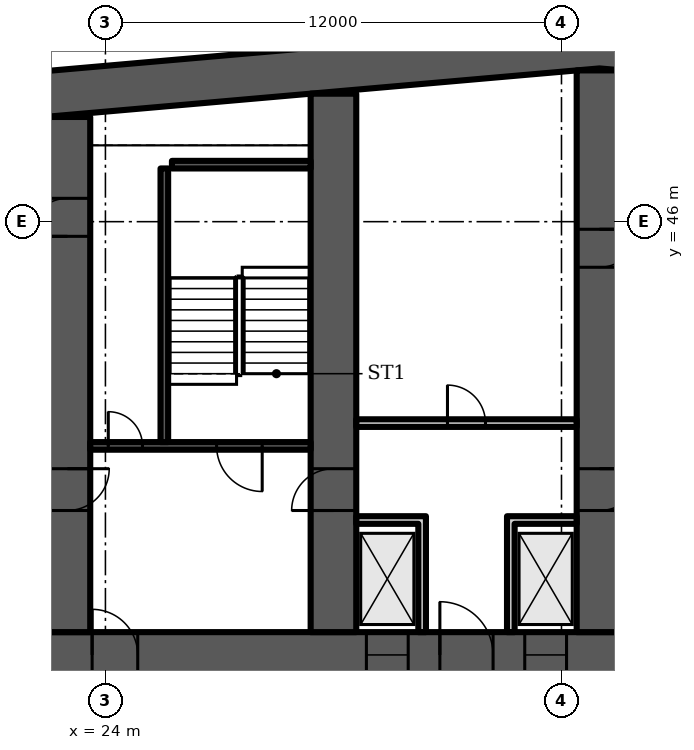
"""IFC4 building model, lengths in metres.
Left out: names, types, materials, properties, quantities, classifications, styles, units other than length and angle.
Written with IfcOpenShell. Run it as: python <this file> out.ifc"""

import sys

from ifc_helpers import new_model, si_unit, direction, frame, frame_2d, origin, place, context, subcontext, project, spatial, polyline, rectangle, outline, extrude, element, fill, save


model = new_model("IFC4")
c1 = context("Model", 3, precision=1e-05, world=origin(), true_north=direction((0.0, 1.0)))
c2 = subcontext(c1, "Body", "Model", "MODEL_VIEW")
j1 = project(units=[si_unit("LENGTHUNIT", "METRE"), si_unit("PLANEANGLEUNIT", "RADIAN")], contexts=[c1])
p1 = place(None, origin())
s1 = spatial("IfcSite", under=j1, at=p1, CompositionType="ELEMENT")
p2 = place(p1, origin())
s2 = spatial("IfcBuilding", under=s1, at=p2, CompositionType="ELEMENT")
p3 = place(p2, frame((0.0, 0.0, 55.9)))
s3 = spatial("IfcBuildingStorey", under=s2, at=p3, CompositionType="ELEMENT", Elevation=55.9)
p4 = place(p3, origin())
e1 = element("IfcWall", 1, at=p4, inside=s3, PredefinedType="SHEAR", context=c2, shape_type="SweptSolid", body=[
    extrude(outline(polyline([(9.0, 47.583), (37.0, 50.032), (65.0, 47.583), (65.0, 48.787), (37.0, 51.237), (9.0, 48.787), (9.0, 47.583)])), origin(), (0.0, 0.0, 1.0), 3.6),
])
p5 = place(p3, frame((9.0, 34.6, 0.0), z_axis=(0.0, 0.0, 1.0), x_axis=(1.0, 0.0, 0.0)))
e2 = element("IfcWall", 2, at=p5, inside=s3, PredefinedType="SHEAR", context=c2, shape_type="SweptSolid", body=[
    extrude(rectangle(XDim=56.0, YDim=1.2, at=frame_2d((28.0, 0.0))), origin(), (0.0, 0.0, 1.0), 3.6),
])
p6 = place(p5, frame((3.3, 0.0, 0.0)))
e3 = element("IfcOpeningElement", 3, at=p6, cuts=e2, PredefinedType="OPENING", context=c2, shape_type="SweptSolid", body=[
    extrude(rectangle(XDim=1.0, YDim=2.1, at=frame_2d((0.5, 1.05))), frame((0.0, 0.61, 0.0), z_axis=(0.0, -1.0, 0.0), x_axis=(1.0, 0.0, 0.0)), (0.0, 0.0, 1.0), 1.22),
])
p7 = place(p5, frame((7.867, 0.0, 0.0)))
e4 = element("IfcOpeningElement", 4, at=p7, cuts=e2, PredefinedType="OPENING", context=c2, shape_type="SweptSolid", body=[
    extrude(rectangle(XDim=1.1, YDim=2.1, at=frame_2d((0.55, 1.05))), frame((0.0, 0.61, 0.0), z_axis=(0.0, -1.0, 0.0), x_axis=(1.0, 0.0, 0.0)), (0.0, 0.0, 1.0), 1.22),
])
p8 = place(p5, frame((12.033, 0.0, 0.0)))
e5 = element("IfcOpeningElement", 5, at=p8, cuts=e2, PredefinedType="OPENING", context=c2, shape_type="SweptSolid", body=[
    extrude(rectangle(XDim=1.1, YDim=2.1, at=frame_2d((0.55, 1.05))), frame((0.0, 0.61, 0.0), z_axis=(0.0, -1.0, 0.0), x_axis=(1.0, 0.0, 0.0)), (0.0, 0.0, 1.0), 1.22),
])
p9 = place(p5, frame((9.8, 0.0, 0.0)))
e6 = element("IfcOpeningElement", 6, at=p9, cuts=e2, PredefinedType="OPENING", context=c2, shape_type="SweptSolid", body=[
    extrude(rectangle(XDim=1.4, YDim=2.1, at=frame_2d((0.7, 1.05))), frame((0.0, 0.61, 0.0), z_axis=(0.0, -1.0, 0.0), x_axis=(1.0, 0.0, 0.0)), (0.0, 0.0, 1.0), 1.22),
])
p10 = place(p5, frame((14.65, 0.0, 0.0)))
e7 = element("IfcOpeningElement", 7, at=p10, cuts=e2, PredefinedType="OPENING", context=c2, shape_type="SweptSolid", body=[
    extrude(rectangle(XDim=1.2, YDim=2.1, at=frame_2d((0.6, 1.05))), frame((0.0, 0.61, 0.0), z_axis=(0.0, -1.0, 0.0), x_axis=(1.0, 0.0, 0.0)), (0.0, 0.0, 1.0), 1.22),
])
p11 = place(p5, frame((21.867, 0.0, 0.0)))
e8 = element("IfcOpeningElement", 8, at=p11, cuts=e2, PredefinedType="OPENING", context=c2, shape_type="SweptSolid", body=[
    extrude(rectangle(XDim=1.1, YDim=2.1, at=frame_2d((0.55, 1.05))), frame((0.0, 0.61, 0.0), z_axis=(0.0, -1.0, 0.0), x_axis=(1.0, 0.0, 0.0)), (0.0, 0.0, 1.0), 1.22),
])
p12 = place(p5, frame((26.033, 0.0, 0.0)))
e9 = element("IfcOpeningElement", 9, at=p12, cuts=e2, PredefinedType="OPENING", context=c2, shape_type="SweptSolid", body=[
    extrude(rectangle(XDim=1.1, YDim=2.1, at=frame_2d((0.55, 1.05))), frame((0.0, 0.61, 0.0), z_axis=(0.0, -1.0, 0.0), x_axis=(1.0, 0.0, 0.0)), (0.0, 0.0, 1.0), 1.22),
])
p13 = place(p5, frame((23.8, 0.0, 0.0)))
e10 = element("IfcOpeningElement", 10, at=p13, cuts=e2, PredefinedType="OPENING", context=c2, shape_type="SweptSolid", body=[
    extrude(rectangle(XDim=1.4, YDim=2.1, at=frame_2d((0.7, 1.05))), frame((0.0, 0.61, 0.0), z_axis=(0.0, -1.0, 0.0), x_axis=(1.0, 0.0, 0.0)), (0.0, 0.0, 1.0), 1.22),
])
p14 = place(p5, frame((28.867, 0.0, 0.0)))
e11 = element("IfcOpeningElement", 11, at=p14, cuts=e2, PredefinedType="OPENING", context=c2, shape_type="SweptSolid", body=[
    extrude(rectangle(XDim=1.1, YDim=2.1, at=frame_2d((0.55, 1.05))), frame((0.0, 0.61, 0.0), z_axis=(0.0, -1.0, 0.0), x_axis=(1.0, 0.0, 0.0)), (0.0, 0.0, 1.0), 1.22),
])
p15 = place(p5, frame((33.033, 0.0, 0.0)))
e12 = element("IfcOpeningElement", 12, at=p15, cuts=e2, PredefinedType="OPENING", context=c2, shape_type="SweptSolid", body=[
    extrude(rectangle(XDim=1.1, YDim=2.1, at=frame_2d((0.55, 1.05))), frame((0.0, 0.61, 0.0), z_axis=(0.0, -1.0, 0.0), x_axis=(1.0, 0.0, 0.0)), (0.0, 0.0, 1.0), 1.22),
])
p16 = place(p5, frame((40.15, 0.0, 0.0)))
e13 = element("IfcOpeningElement", 13, at=p16, cuts=e2, PredefinedType="OPENING", context=c2, shape_type="SweptSolid", body=[
    extrude(rectangle(XDim=1.2, YDim=2.1, at=frame_2d((0.6, 1.05))), frame((0.0, 0.61, 0.0), z_axis=(0.0, -1.0, 0.0), x_axis=(1.0, 0.0, 0.0)), (0.0, 0.0, 1.0), 1.22),
])
p17 = place(p5, frame((44.8, 0.0, 0.0)))
e14 = element("IfcOpeningElement", 14, at=p17, cuts=e2, PredefinedType="OPENING", context=c2, shape_type="SweptSolid", body=[
    extrude(rectangle(XDim=1.4, YDim=2.1, at=frame_2d((0.7, 1.05))), frame((0.0, 0.61, 0.0), z_axis=(0.0, -1.0, 0.0), x_axis=(1.0, 0.0, 0.0)), (0.0, 0.0, 1.0), 1.22),
])
p18 = place(p5, frame((49.867, 0.0, 0.0)))
e15 = element("IfcOpeningElement", 15, at=p18, cuts=e2, PredefinedType="OPENING", context=c2, shape_type="SweptSolid", body=[
    extrude(rectangle(XDim=1.1, YDim=2.1, at=frame_2d((0.55, 1.05))), frame((0.0, 0.61, 0.0), z_axis=(0.0, -1.0, 0.0), x_axis=(1.0, 0.0, 0.0)), (0.0, 0.0, 1.0), 1.22),
])
p19 = place(p5, frame((53.5, 0.0, 0.0)))
e16 = element("IfcOpeningElement", 16, at=p19, cuts=e2, PredefinedType="OPENING", context=c2, shape_type="SweptSolid", body=[
    extrude(rectangle(XDim=1.1, YDim=2.1, at=frame_2d((0.55, 1.05))), frame((0.0, 0.61, 0.0), z_axis=(0.0, -1.0, 0.0), x_axis=(1.0, 0.0, 0.0)), (0.0, 0.0, 1.0), 1.22),
])
p20 = place(p5, frame((51.567, 0.0, 0.0)))
e17 = element("IfcOpeningElement", 17, at=p20, cuts=e2, PredefinedType="OPENING", context=c2, shape_type="SweptSolid", body=[
    extrude(rectangle(XDim=1.4, YDim=2.1, at=frame_2d((0.7, 1.05))), frame((0.0, 0.61, 0.0), z_axis=(0.0, -1.0, 0.0), x_axis=(1.0, 0.0, 0.0)), (0.0, 0.0, 1.0), 1.22),
])
p21 = place(p3, frame((23.0, 35.2, 0.0), z_axis=(0.0, 0.0, 1.0), x_axis=(0.0, 1.0, 0.0)))
e18 = element("IfcWall", 18, at=p21, inside=s3, PredefinedType="SHEAR", context=c2, shape_type="SweptSolid", body=[
    extrude(rectangle(XDim=13.555, YDim=1.2, at=frame_2d((6.778, 0.0))), origin(), (0.0, 0.0, 1.0), 3.6),
])
p22 = place(p21, frame((10.414, 0.0, 0.0)))
e19 = element("IfcOpeningElement", 19, at=p22, cuts=e18, PredefinedType="OPENING", context=c2, shape_type="SweptSolid", body=[
    extrude(rectangle(XDim=1.0, YDim=2.1, at=frame_2d((0.5, 1.05))), frame((0.0, 0.61, 0.0), z_axis=(0.0, -1.0, 0.0), x_axis=(1.0, 0.0, 0.0)), (0.0, 0.0, 1.0), 1.22),
])
p23 = place(p21, frame((3.2, 0.0, 0.0)))
e20 = element("IfcOpeningElement", 20, at=p23, cuts=e18, PredefinedType="OPENING", context=c2, shape_type="SweptSolid", body=[
    extrude(rectangle(XDim=1.1, YDim=2.1, at=frame_2d((0.55, 1.05))), frame((0.0, 0.61, 0.0), z_axis=(0.0, -1.0, 0.0), x_axis=(1.0, 0.0, 0.0)), (0.0, 0.0, 1.0), 1.22),
])
p24 = place(p3, frame((30.0, 35.2, 0.0), z_axis=(0.0, 0.0, 1.0), x_axis=(0.0, 1.0, 0.0)))
e21 = element("IfcWall", 21, at=p24, inside=s3, PredefinedType="SHEAR", context=c2, shape_type="SweptSolid", body=[
    extrude(rectangle(XDim=14.168, YDim=1.2, at=frame_2d((7.084, 0.0))), origin(), (0.0, 0.0, 1.0), 3.6),
])
p25 = place(p24, frame((3.2, 0.0, 0.0)))
e22 = element("IfcOpeningElement", 22, at=p25, cuts=e21, PredefinedType="OPENING", context=c2, shape_type="SweptSolid", body=[
    extrude(rectangle(XDim=1.1, YDim=2.1, at=frame_2d((0.55, 1.05))), frame((0.0, 0.61, 0.0), z_axis=(0.0, -1.0, 0.0), x_axis=(1.0, 0.0, 0.0)), (0.0, 0.0, 1.0), 1.22),
])
p26 = place(p3, frame((37.0, 35.2, 0.0), z_axis=(0.0, 0.0, 1.0), x_axis=(0.0, 1.0, 0.0)))
e23 = element("IfcWall", 23, at=p26, inside=s3, PredefinedType="SHEAR", context=c2, shape_type="SweptSolid", body=[
    extrude(rectangle(XDim=14.78, YDim=1.2, at=frame_2d((7.39, 0.0))), origin(), (0.0, 0.0, 1.0), 3.6),
])
p27 = place(p26, frame((3.2, 0.0, 0.0)))
e24 = element("IfcOpeningElement", 24, at=p27, cuts=e23, PredefinedType="OPENING", context=c2, shape_type="SweptSolid", body=[
    extrude(rectangle(XDim=1.1, YDim=2.1, at=frame_2d((0.55, 1.05))), frame((0.0, 0.61, 0.0), z_axis=(0.0, -1.0, 0.0), x_axis=(1.0, 0.0, 0.0)), (0.0, 0.0, 1.0), 1.22),
])
p28 = place(p26, frame((9.6, 0.0, 0.0)))
e25 = element("IfcOpeningElement", 25, at=p28, cuts=e23, PredefinedType="OPENING", context=c2, shape_type="SweptSolid", body=[
    extrude(rectangle(XDim=1.0, YDim=2.1, at=frame_2d((0.5, 1.05))), frame((0.0, 0.61, 0.0), z_axis=(0.0, -1.0, 0.0), x_axis=(1.0, 0.0, 0.0)), (0.0, 0.0, 1.0), 1.22),
])
p29 = place(p3, frame((23.6, 40.1, 0.0), z_axis=(0.0, 0.0, 1.0), x_axis=(1.0, 0.0, 0.0)))
e26 = element("IfcWall", 26, at=p29, inside=s3, PredefinedType="SHEAR", context=c2, shape_type="SweptSolid", body=[
    extrude(rectangle(XDim=5.8, YDim=0.2, at=frame_2d((2.9, 0.0))), origin(), (0.0, 0.0, 1.0), 3.2),
])
p30 = place(p29, frame((3.325, 0.0, 0.0)))
e27 = element("IfcOpeningElement", 27, at=p30, cuts=e26, PredefinedType="OPENING", context=c2, shape_type="SweptSolid", body=[
    extrude(rectangle(XDim=1.2, YDim=2.1, at=frame_2d((0.6, 1.05))), frame((0.0, 0.11, 0.0), z_axis=(0.0, -1.0, 0.0), x_axis=(1.0, 0.0, 0.0)), (0.0, 0.0, 1.0), 0.22),
])
p31 = place(p29, frame((0.475, 0.0, 0.0)))
e28 = element("IfcOpeningElement", 28, at=p31, cuts=e26, PredefinedType="OPENING", context=c2, shape_type="SweptSolid", body=[
    extrude(rectangle(XDim=0.9, YDim=2.1, at=frame_2d((0.45, 1.05))), frame((0.0, 0.11, 0.0), z_axis=(0.0, -1.0, 0.0), x_axis=(1.0, 0.0, 0.0)), (0.0, 0.0, 1.0), 0.22),
])
p32 = place(p3, frame((25.55, 40.2, 0.0), z_axis=(0.0, 0.0, 1.0), x_axis=(0.0, 1.0, 0.0)))
e29 = element("IfcWall", 29, at=p32, inside=s3, PredefinedType="SHEAR", context=c2, shape_type="SweptSolid", body=[
    extrude(rectangle(XDim=7.2, YDim=0.2, at=frame_2d((3.6, 0.0))), origin(), (0.0, 0.0, 1.0), 3.2),
])
p33 = place(p3, frame((25.75, 47.5, 0.0), z_axis=(0.0, 0.0, 1.0), x_axis=(1.0, 0.0, 0.0)))
e30 = element("IfcWall", 30, at=p33, inside=s3, PredefinedType="SHEAR", context=c2, shape_type="SweptSolid", body=[
    extrude(rectangle(XDim=3.65, YDim=0.2, at=frame_2d((1.825, 0.0))), origin(), (0.0, 0.0, 1.0), 3.2),
])
p34 = place(p3, frame((30.6, 40.7, 0.0), z_axis=(0.0, 0.0, 1.0), x_axis=(1.0, 0.0, 0.0)))
e31 = element("IfcWall", 31, at=p34, inside=s3, PredefinedType="PARTITIONING", context=c2, shape_type="SweptSolid", body=[
    extrude(rectangle(XDim=5.8, YDim=0.2, at=frame_2d((2.9, 0.0))), origin(), (0.0, 0.0, 1.0), 3.2),
])
p35 = place(p34, frame((2.4, 0.0, 0.0)))
e32 = element("IfcOpeningElement", 32, at=p35, cuts=e31, PredefinedType="OPENING", context=c2, shape_type="SweptSolid", body=[
    extrude(rectangle(XDim=1.0, YDim=2.1, at=frame_2d((0.5, 1.05))), frame((0.0, 0.11, 0.0), z_axis=(0.0, -1.0, 0.0), x_axis=(1.0, 0.0, 0.0)), (0.0, 0.0, 1.0), 0.22),
])
p36 = place(p3, origin())
e33 = element("IfcWall", 33, at=p36, inside=s3, PredefinedType="PARTITIONING", context=c2, shape_type="SweptSolid", body=[
    extrude(outline(polyline([(32.233, 38.05), (30.6, 38.05), (30.6, 38.25), (32.233, 38.25), (32.433, 38.25), (32.433, 35.2), (32.233, 35.2), (32.233, 38.05)])), origin(), (0.0, 0.0, 1.0), 3.2),
])
p37 = place(p3, origin())
e34 = element("IfcWall", 34, at=p37, inside=s3, PredefinedType="PARTITIONING", context=c2, shape_type="SweptSolid", body=[
    extrude(outline(polyline([(34.567, 38.25), (34.767, 38.25), (36.4, 38.25), (36.4, 38.05), (34.767, 38.05), (34.767, 35.2), (34.567, 35.2), (34.567, 38.25)])), origin(), (0.0, 0.0, 1.0), 3.2),
])
p38 = place(p22, origin())
e35 = element("IfcDoor", 35, at=p38, inside=s3, OperationType="SINGLE_SWING_LEFT", PredefinedType="DOOR", context=c2, shape_type="SweptSolid", body=[
    extrude(rectangle(XDim=1.0, YDim=2.1, at=frame_2d((0.5, 1.05))), frame((0.0, 0.6, 0.0), z_axis=(0.0, -1.0, 0.0), x_axis=(1.0, 0.0, 0.0)), (0.0, 0.0, 1.0), 1.199),
])
fill(e19, e35)
p39 = place(p30, origin())
e36 = element("IfcDoor", 36, at=p39, inside=s3, OperationType="SINGLE_SWING_RIGHT", PredefinedType="DOOR", context=c2, shape_type="SweptSolid", body=[
    extrude(rectangle(XDim=1.2, YDim=2.1, at=frame_2d((0.6, 1.05))), frame((0.0, 0.025, 0.0), z_axis=(0.0, -1.0, 0.0), x_axis=(1.0, 0.0, 0.0)), (0.0, 0.0, 1.0), 0.05),
])
fill(e27, e36)
p40 = place(p31, origin())
e37 = element("IfcDoor", 37, at=p40, inside=s3, OperationType="SINGLE_SWING_LEFT", PredefinedType="DOOR", context=c2, shape_type="SweptSolid", body=[
    extrude(rectangle(XDim=0.9, YDim=2.1, at=frame_2d((0.45, 1.05))), frame((0.0, 0.025, 0.0), z_axis=(0.0, -1.0, 0.0), x_axis=(1.0, 0.0, 0.0)), (0.0, 0.0, 1.0), 0.05),
])
fill(e28, e37)
p41 = place(p10, origin())
e38 = element("IfcDoor", 38, at=p41, inside=s3, OperationType="SINGLE_SWING_LEFT", PredefinedType="DOOR", context=c2, shape_type="SweptSolid", body=[
    extrude(rectangle(XDim=1.2, YDim=2.1, at=frame_2d((0.6, 1.05))), frame((0.0, 0.025, 0.0), z_axis=(0.0, -1.0, 0.0), x_axis=(1.0, 0.0, 0.0)), (0.0, 0.0, 1.0), 0.05),
])
fill(e7, e38)
p42 = place(p11, origin())
e39 = element("IfcDoor", 39, at=p42, inside=s3, OperationType="DOUBLE_DOOR_SLIDING", PredefinedType="DOOR", context=c2, shape_type="SweptSolid", body=[
    extrude(rectangle(XDim=1.1, YDim=2.1, at=frame_2d((0.55, 1.05))), frame((0.0, 0.025, 0.0), z_axis=(0.0, -1.0, 0.0), x_axis=(1.0, 0.0, 0.0)), (0.0, 0.0, 1.0), 0.05),
])
fill(e8, e39)
p43 = place(p12, origin())
e40 = element("IfcDoor", 40, at=p43, inside=s3, OperationType="DOUBLE_DOOR_SLIDING", PredefinedType="DOOR", context=c2, shape_type="SweptSolid", body=[
    extrude(rectangle(XDim=1.1, YDim=2.1, at=frame_2d((0.55, 1.05))), frame((0.0, 0.025, 0.0), z_axis=(0.0, -1.0, 0.0), x_axis=(1.0, 0.0, 0.0)), (0.0, 0.0, 1.0), 0.05),
])
fill(e9, e40)
p44 = place(p13, origin())
e41 = element("IfcDoor", 41, at=p44, inside=s3, OperationType="DOUBLE_DOOR_SINGLE_SWING", PredefinedType="DOOR", context=c2, shape_type="SweptSolid", body=[
    extrude(rectangle(XDim=1.4, YDim=2.1, at=frame_2d((0.7, 1.05))), frame((0.0, 0.025, 0.0), z_axis=(0.0, -1.0, 0.0), x_axis=(1.0, 0.0, 0.0)), (0.0, 0.0, 1.0), 0.05),
])
fill(e10, e41)
p45 = place(p35, origin())
e42 = element("IfcDoor", 42, at=p45, inside=s3, OperationType="SINGLE_SWING_LEFT", PredefinedType="DOOR", context=c2, shape_type="SweptSolid", body=[
    extrude(rectangle(XDim=1.0, YDim=2.1, at=frame_2d((0.5, 1.05))), frame((0.0, 0.025, 0.0), z_axis=(0.0, -1.0, 0.0), x_axis=(1.0, 0.0, 0.0)), (0.0, 0.0, 1.0), 0.05),
])
fill(e32, e42)
p46 = place(p23, origin())
e43 = element("IfcDoor", 43, at=p46, inside=s3, OperationType="SINGLE_SWING_RIGHT", PredefinedType="DOOR", context=c2, shape_type="SweptSolid", body=[
    extrude(rectangle(XDim=1.1, YDim=2.1, at=frame_2d((0.55, 1.05))), frame((0.0, 0.025, 0.0), z_axis=(0.0, -1.0, 0.0), x_axis=(1.0, 0.0, 0.0)), (0.0, 0.0, 1.0), 0.05),
])
fill(e20, e43)
p47 = place(p25, origin())
e44 = element("IfcDoor", 44, at=p47, inside=s3, OperationType="SINGLE_SWING_LEFT", PredefinedType="DOOR", context=c2, shape_type="SweptSolid", body=[
    extrude(rectangle(XDim=1.1, YDim=2.1, at=frame_2d((0.55, 1.05))), frame((0.0, 0.025, 0.0), z_axis=(0.0, -1.0, 0.0), x_axis=(1.0, 0.0, 0.0)), (0.0, 0.0, 1.0), 0.05),
])
fill(e22, e44)
p48 = place(p27, origin())
e45 = element("IfcDoor", 45, at=p48, inside=s3, OperationType="SINGLE_SWING_RIGHT", PredefinedType="DOOR", context=c2, shape_type="SweptSolid", body=[
    extrude(rectangle(XDim=1.1, YDim=2.1, at=frame_2d((0.55, 1.05))), frame((0.0, 0.025, 0.0), z_axis=(0.0, -1.0, 0.0), x_axis=(1.0, 0.0, 0.0)), (0.0, 0.0, 1.0), 0.05),
])
fill(e24, e45)
p49 = place(p28, origin())
e46 = element("IfcDoor", 46, at=p49, inside=s3, OperationType="SINGLE_SWING_RIGHT", PredefinedType="DOOR", context=c2, shape_type="SweptSolid", body=[
    extrude(rectangle(XDim=1.0, YDim=2.1, at=frame_2d((0.5, 1.05))), frame((0.0, 0.6, 0.0), z_axis=(0.0, -1.0, 0.0), x_axis=(1.0, 0.0, 0.0)), (0.0, 0.0, 1.0), 1.199),
])
fill(e25, e46)
save(model, sys.argv[1])
